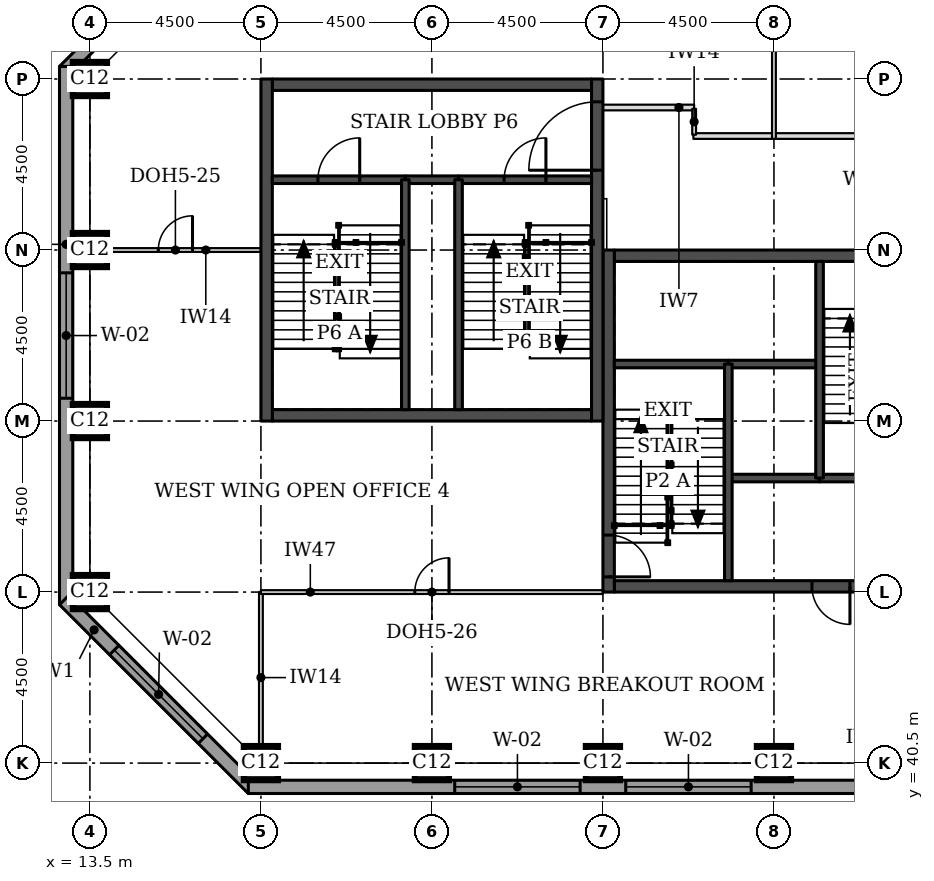
"""IFC4 building model, lengths in metres.
Left out: names, types, materials, properties, quantities, classifications, styles, units other than length and angle.
Written with IfcOpenShell. Run it as: python <this file> out.ifc"""

import sys

from ifc_helpers import new_model, si_unit, direction, frame, frame_2d, origin, origin_2d, place, context, subcontext, project, spatial, rectangle, extrude, element, fill, save


model = new_model("IFC4")
c1 = context("Model", 3, precision=1e-05, world=origin(), true_north=direction((0.0, 1.0)))
c2 = subcontext(c1, "Body", "Model", "MODEL_VIEW")
j1 = project(units=[si_unit("LENGTHUNIT", "METRE"), si_unit("PLANEANGLEUNIT", "RADIAN")], contexts=[c1])
p1 = place(None, origin())
s1 = spatial("IfcSite", under=j1, at=p1, CompositionType="ELEMENT")
p2 = place(p1, origin())
s2 = spatial("IfcBuilding", under=s1, at=p2, CompositionType="ELEMENT")
p3 = place(p2, frame((0.0, 0.0, 177.3)))
s3 = spatial("IfcBuildingStorey", under=s2, at=p3, CompositionType="ELEMENT", Elevation=177.3)
for number, where, z_axis, x_axis in (
    (1, (18.0, 40.5, 0.0), (0.0, 0.0, 1.0), (1.0, 0.0, 0.0)),
    (2, (22.5, 40.5, 0.0), (0.0, 0.0, 1.0), (1.0, 0.0, 0.0)),
    (3, (27.0, 40.5, 0.0), (0.0, 0.0, 1.0), (1.0, 0.0, 0.0)),
    (4, (31.5, 40.5, 0.0), (0.0, 0.0, 1.0), (1.0, 0.0, 0.0)),
    (5, (13.5, 45.0, 0.0), (0.0, 0.0, 1.0), (1.0, 0.0, 0.0)),
    (6, (13.5, 49.5, 0.0), (0.0, 0.0, 1.0), (1.0, 0.0, 0.0)),
    (7, (13.5, 54.0, 0.0), (0.0, 0.0, 1.0), (1.0, 0.0, 0.0)),
    (8, (13.5, 58.5, 0.0), (0.0, 0.0, 1.0), (1.0, 0.0, 0.0)),
):
    element("IfcColumn", number, at=place(p3, frame(where, z_axis=z_axis, x_axis=x_axis)), inside=s3, PredefinedType="COLUMN", context=c2, shape_type="SweptSolid", body=[
        extrude(rectangle(XDim=0.9, YDim=0.9, at=origin_2d()), origin(), (0.0, 0.0, 1.0), 3.7),
    ])
p4 = place(p3, frame((27.3, 45.15, 0.0), z_axis=(0.0, 0.0, 1.0), x_axis=(1.0, 0.0, 0.0)))
e9 = element("IfcWall", 9, at=p4, inside=s3, PredefinedType="SHEAR", context=c2, shape_type="SweptSolid", body=[
    extrude(rectangle(XDim=8.4, YDim=0.3, at=frame_2d((4.2, 0.0))), origin(), (0.0, 0.0, 1.0), 3.7),
])
p5 = place(p4, frame((5.2, 0.0, 0.0)))
e10 = element("IfcOpeningElement", 10, at=p5, cuts=e9, PredefinedType="OPENING", context=c2, shape_type="SweptSolid", body=[
    extrude(rectangle(XDim=1.0, YDim=2.1, at=frame_2d((0.5, 1.05))), frame((0.0, 0.16, 0.0), z_axis=(0.0, -1.0, 0.0), x_axis=(1.0, 0.0, 0.0)), (0.0, 0.0, 1.0), 0.32),
])
p6 = place(p3, frame((27.3, 53.85, 0.0), z_axis=(0.0, 0.0, 1.0), x_axis=(1.0, 0.0, 0.0)))
e11 = element("IfcWall", 11, at=p6, inside=s3, PredefinedType="SHEAR", context=c2, shape_type="SweptSolid", body=[
    extrude(rectangle(XDim=8.4, YDim=0.3, at=frame_2d((4.2, 0.0))), origin(), (0.0, 0.0, 1.0), 3.7),
])
p7 = place(p6, frame((6.4, 0.0, 0.0)))
e12 = element("IfcOpeningElement", 12, at=p7, cuts=e11, PredefinedType="OPENING", context=c2, shape_type="SweptSolid", body=[
    extrude(rectangle(XDim=1.1, YDim=2.1, at=frame_2d((0.55, 1.05))), frame((0.0, 0.16, 0.0), z_axis=(0.0, -1.0, 0.0), x_axis=(1.0, 0.0, 0.0)), (0.0, 0.0, 1.0), 0.32),
])
p8 = place(p3, frame((27.15, 45.0, 0.0), z_axis=(0.0, 0.0, 1.0), x_axis=(0.0, 1.0, 0.0)))
e13 = element("IfcWall", 13, at=p8, inside=s3, PredefinedType="SHEAR", context=c2, shape_type="SweptSolid", body=[
    extrude(rectangle(XDim=9.0, YDim=0.3, at=frame_2d((4.5, 0.0))), origin(), (0.0, 0.0, 1.0), 3.7),
])
p9 = place(p8, frame((0.4, 0.0, 0.0)))
e14 = element("IfcOpeningElement", 14, at=p9, cuts=e13, PredefinedType="OPENING", context=c2, shape_type="SweptSolid", body=[
    extrude(rectangle(XDim=1.1, YDim=2.1, at=frame_2d((0.55, 1.05))), frame((0.0, 0.16, 0.0), z_axis=(0.0, -1.0, 0.0), x_axis=(1.0, 0.0, 0.0)), (0.0, 0.0, 1.0), 0.32),
])
for number, where, z_axis, x_axis in (
    (15, (18.3, 49.65, 0.0), (0.0, 0.0, 1.0), (1.0, 0.0, 0.0)),
    (16, (18.3, 58.35, 0.0), (0.0, 0.0, 1.0), (1.0, 0.0, 0.0)),
):
    element("IfcWall", number, at=place(p3, frame(where, z_axis=z_axis, x_axis=x_axis)), inside=s3, PredefinedType="SHEAR", context=c2, shape_type="SweptSolid", body=[
        extrude(rectangle(XDim=8.4, YDim=0.3, at=frame_2d((4.2, 0.0))), origin(), (0.0, 0.0, 1.0), 3.7),
    ])
p10 = place(p3, frame((18.15, 49.5, 0.0), z_axis=(0.0, 0.0, 1.0), x_axis=(0.0, 1.0, 0.0)))
e17 = element("IfcWall", 17, at=p10, inside=s3, PredefinedType="SHEAR", context=c2, shape_type="SweptSolid", body=[
    extrude(rectangle(XDim=9.0, YDim=0.3, at=frame_2d((4.5, 0.0))), origin(), (0.0, 0.0, 1.0), 3.7),
])
p11 = place(p3, frame((26.85, 49.5, 0.0), z_axis=(0.0, 0.0, 1.0), x_axis=(0.0, 1.0, 0.0)))
e18 = element("IfcWall", 18, at=p11, inside=s3, PredefinedType="SHEAR", context=c2, shape_type="SweptSolid", body=[
    extrude(rectangle(XDim=9.0, YDim=0.3, at=frame_2d((4.5, 0.0))), origin(), (0.0, 0.0, 1.0), 3.7),
])
p12 = place(p11, frame((6.6, 0.0, 0.0)))
e19 = element("IfcOpeningElement", 19, at=p12, cuts=e18, PredefinedType="OPENING", context=c2, shape_type="SweptSolid", body=[
    extrude(rectangle(XDim=1.8, YDim=2.1, at=frame_2d((0.9, 1.05))), frame((0.0, 0.16, 0.0), z_axis=(0.0, -1.0, 0.0), x_axis=(1.0, 0.0, 0.0)), (0.0, 0.0, 1.0), 0.32),
])
p13 = place(p3, frame((17.792, 63.676, 0.0), z_axis=(0.0, 0.0, 1.0), x_axis=(-0.707106781187, -0.707106781187, 0.0)))
e20 = element("IfcWall", 20, at=p13, inside=s3, PredefinedType="STANDARD", context=c2, shape_type="SweptSolid", body=[
    extrude(rectangle(XDim=7.027, YDim=0.35, at=frame_2d((3.513, 0.0))), origin(), (0.0, 0.0, 1.0), 3.525),
])
p14 = place(p13, frame((1.863, 0.0, 0.9)))
e21 = element("IfcOpeningElement", 21, at=p14, cuts=e20, PredefinedType="OPENING", context=c2, shape_type="SweptSolid", body=[
    extrude(rectangle(XDim=3.3, YDim=1.9, at=frame_2d((1.65, 0.95))), frame((0.0, 0.185, 0.0), z_axis=(0.0, -1.0, 0.0), x_axis=(1.0, 0.0, 0.0)), (0.0, 0.0, 1.0), 0.37),
])
p15 = place(p3, frame((12.875, 58.831, 0.0), z_axis=(0.0, 0.0, 1.0), x_axis=(0.0, -1.0, 0.0)))
e22 = element("IfcWall", 22, at=p15, inside=s3, PredefinedType="STANDARD", context=c2, shape_type="SweptSolid", body=[
    extrude(rectangle(XDim=14.163, YDim=0.35, at=frame_2d((7.081, 0.0))), origin(), (0.0, 0.0, 1.0), 3.525),
])
p16 = place(p15, frame((5.431, 0.0, 0.9)))
e23 = element("IfcOpeningElement", 23, at=p16, cuts=e22, PredefinedType="OPENING", context=c2, shape_type="SweptSolid", body=[
    extrude(rectangle(XDim=3.3, YDim=1.9, at=frame_2d((1.65, 0.95))), frame((0.0, 0.185, 0.0), z_axis=(0.0, -1.0, 0.0), x_axis=(1.0, 0.0, 0.0)), (0.0, 0.0, 1.0), 0.37),
])
p17 = place(p3, frame((12.824, 44.792, 0.0), z_axis=(0.0, 0.0, 1.0), x_axis=(0.707106781187, -0.707106781187, 0.0)))
e24 = element("IfcWall", 24, at=p17, inside=s3, PredefinedType="STANDARD", context=c2, shape_type="SweptSolid", body=[
    extrude(rectangle(XDim=7.027, YDim=0.35, at=frame_2d((3.513, 0.0))), origin(), (0.0, 0.0, 1.0), 3.525),
])
p18 = place(p17, frame((1.863, 0.0, 0.9)))
e25 = element("IfcOpeningElement", 25, at=p18, cuts=e24, PredefinedType="OPENING", context=c2, shape_type="SweptSolid", body=[
    extrude(rectangle(XDim=3.3, YDim=1.9, at=frame_2d((1.65, 0.95))), frame((0.0, 0.185, 0.0), z_axis=(0.0, -1.0, 0.0), x_axis=(1.0, 0.0, 0.0)), (0.0, 0.0, 1.0), 0.37),
])
p19 = place(p3, frame((17.669, 39.875, 0.0), z_axis=(0.0, 0.0, 1.0), x_axis=(1.0, 0.0, 0.0)))
e26 = element("IfcWall", 26, at=p19, inside=s3, PredefinedType="STANDARD", context=c2, shape_type="SweptSolid", body=[
    extrude(rectangle(XDim=18.331, YDim=0.35, at=frame_2d((9.166, 0.0))), origin(), (0.0, 0.0, 1.0), 3.525),
])
p20 = place(p19, frame((5.431, 0.0, 0.9)))
e27 = element("IfcOpeningElement", 27, at=p20, cuts=e26, PredefinedType="OPENING", context=c2, shape_type="SweptSolid", body=[
    extrude(rectangle(XDim=3.3, YDim=1.9, at=frame_2d((1.65, 0.95))), frame((0.0, 0.185, 0.0), z_axis=(0.0, -1.0, 0.0), x_axis=(1.0, 0.0, 0.0)), (0.0, 0.0, 1.0), 0.37),
])
p21 = place(p19, frame((9.931, 0.0, 0.9)))
e28 = element("IfcOpeningElement", 28, at=p21, cuts=e26, PredefinedType="OPENING", context=c2, shape_type="SweptSolid", body=[
    extrude(rectangle(XDim=3.3, YDim=1.9, at=frame_2d((1.65, 0.95))), frame((0.0, 0.185, 0.0), z_axis=(0.0, -1.0, 0.0), x_axis=(1.0, 0.0, 0.0)), (0.0, 0.0, 1.0), 0.37),
])
p22 = place(p3, frame((29.38, 57.0, 0.0), z_axis=(0.0, 0.0, 1.0), x_axis=(1.0, 0.0, 0.0)))
e29 = element("IfcWall", 29, at=p22, inside=s3, PredefinedType="PARTITIONING", context=c2, shape_type="SweptSolid", body=[
    extrude(rectangle(XDim=12.695, YDim=0.15, at=frame_2d((6.348, 0.0))), origin(), (0.0, 0.0, 1.0), 3.55),
])
p23 = place(p3, frame((31.5, 63.0, 0.0), z_axis=(0.0, 0.0, 1.0), x_axis=(0.0, -1.0, 0.0)))
e30 = element("IfcWall", 30, at=p23, inside=s3, PredefinedType="PARTITIONING", context=c2, shape_type="SweptSolid", body=[
    extrude(rectangle(XDim=6.075, YDim=0.1, at=frame_2d((3.038, 0.0))), origin(), (0.0, 0.0, 1.0), 3.55),
])
p24 = place(p23, frame((2.588, 0.0, 0.0)))
e31 = element("IfcOpeningElement", 31, at=p24, cuts=e30, PredefinedType="OPENING", context=c2, shape_type="SweptSolid", body=[
    extrude(rectangle(XDim=0.9, YDim=2.1, at=frame_2d((0.45, 1.05))), frame((0.0, 0.06, 0.0), z_axis=(0.0, -1.0, 0.0), x_axis=(1.0, 0.0, 0.0)), (0.0, 0.0, 1.0), 0.12),
])
p25 = place(p3, frame((13.5, 54.0, 0.0), z_axis=(0.0, 0.0, 1.0), x_axis=(1.0, 0.0, 0.0)))
e32 = element("IfcWall", 32, at=p25, inside=s3, PredefinedType="PARTITIONING", context=c2, shape_type="SweptSolid", body=[
    extrude(rectangle(XDim=4.5, YDim=0.1, at=frame_2d((2.25, 0.0))), origin(), (0.0, 0.0, 1.0), 3.55),
])
p26 = place(p25, frame((1.8, 0.0, 0.0)))
e33 = element("IfcOpeningElement", 33, at=p26, cuts=e32, PredefinedType="OPENING", context=c2, shape_type="SweptSolid", body=[
    extrude(rectangle(XDim=0.9, YDim=2.1, at=frame_2d((0.45, 1.05))), frame((0.0, 0.06, 0.0), z_axis=(0.0, -1.0, 0.0), x_axis=(1.0, 0.0, 0.0)), (0.0, 0.0, 1.0), 0.12),
])
p27 = place(p3, frame((18.0, 40.5, 0.0), z_axis=(0.0, 0.0, 1.0), x_axis=(0.0, 1.0, 0.0)))
e34 = element("IfcWall", 34, at=p27, inside=s3, PredefinedType="PARTITIONING", context=c2, shape_type="SweptSolid", body=[
    extrude(rectangle(XDim=4.5, YDim=0.1, at=frame_2d((2.25, 0.0))), origin(), (0.0, 0.0, 1.0), 3.55),
])
p28 = place(p3, frame((18.0, 45.0, 0.0), z_axis=(0.0, 0.0, 1.0), x_axis=(1.0, 0.0, 0.0)))
e35 = element("IfcWall", 35, at=p28, inside=s3, PredefinedType="PARTITIONING", context=c2, shape_type="SweptSolid", body=[
    extrude(rectangle(XDim=9.0, YDim=0.1, at=frame_2d((4.5, 0.0))), origin(), (0.0, 0.0, 1.0), 2.55),
])
p29 = place(p28, frame((4.05, 0.0, 0.0)))
e36 = element("IfcOpeningElement", 36, at=p29, cuts=e35, PredefinedType="OPENING", context=c2, shape_type="SweptSolid", body=[
    extrude(rectangle(XDim=0.9, YDim=2.1, at=frame_2d((0.45, 1.05))), frame((0.0, 0.06, 0.0), z_axis=(0.0, -1.0, 0.0), x_axis=(1.0, 0.0, 0.0)), (0.0, 0.0, 1.0), 0.12),
])
p30 = place(p3, frame((27.0, 57.75, 0.0), z_axis=(0.0, 0.0, 1.0), x_axis=(1.0, 0.0, 0.0)))
e37 = element("IfcWall", 37, at=p30, inside=s3, PredefinedType="PARTITIONING", context=c2, shape_type="SweptSolid", body=[
    extrude(rectangle(XDim=2.4, YDim=0.15, at=frame_2d((1.2, 0.0))), origin(), (0.0, 0.0, 1.0), 3.55),
])
p31 = place(p3, frame((29.4, 57.715, 0.0), z_axis=(0.0, 0.0, 1.0), x_axis=(0.0, -1.0, 0.0)))
e38 = element("IfcWall", 38, at=p31, inside=s3, PredefinedType="PARTITIONING", context=c2, shape_type="SweptSolid", body=[
    extrude(rectangle(XDim=0.68, YDim=0.1, at=frame_2d((0.34, 0.0))), origin(), (0.0, 0.0, 1.0), 3.55),
])
p32 = place(p3, frame((30.3, 48.0, 0.0), z_axis=(0.0, 0.0, 1.0), x_axis=(1.0, 0.0, 0.0)))
e39 = element("IfcWall", 39, at=p32, inside=s3, PredefinedType="SOLIDWALL", context=c2, shape_type="SweptSolid", body=[
    extrude(rectangle(XDim=2.4, YDim=0.2, at=frame_2d((1.2, 0.0))), origin(), (0.0, 0.0, 1.0), 3.55),
])
p33 = place(p3, frame((32.7, 48.0, 0.0), z_axis=(0.0, 0.0, 1.0), x_axis=(1.0, 0.0, 0.0)))
e40 = element("IfcWall", 40, at=p33, inside=s3, PredefinedType="SOLIDWALL", context=c2, shape_type="SweptSolid", body=[
    extrude(rectangle(XDim=3.0, YDim=0.2, at=frame_2d((1.5, 0.0))), origin(), (0.0, 0.0, 1.0), 3.55),
])
p34 = place(p3, frame((30.3, 51.0, 0.0), z_axis=(0.0, 0.0, 1.0), x_axis=(1.0, 0.0, 0.0)))
e41 = element("IfcWall", 41, at=p34, inside=s3, PredefinedType="SOLIDWALL", context=c2, shape_type="SweptSolid", body=[
    extrude(rectangle(XDim=2.4, YDim=0.2, at=frame_2d((1.2, 0.0))), origin(), (0.0, 0.0, 1.0), 3.7),
])
p35 = place(p3, frame((27.3, 51.0, 0.0), z_axis=(0.0, 0.0, 1.0), x_axis=(1.0, 0.0, 0.0)))
e42 = element("IfcWall", 42, at=p35, inside=s3, PredefinedType="SOLIDWALL", context=c2, shape_type="SweptSolid", body=[
    extrude(rectangle(XDim=3.0, YDim=0.2, at=frame_2d((1.5, 0.0))), origin(), (0.0, 0.0, 1.0), 3.55),
])
for number, where, z_axis, x_axis in (
    (43, (30.3, 45.3, 0.0), (0.0, 0.0, 1.0), (0.0, 1.0, 0.0)),
    (44, (32.7, 48.0, 0.0), (0.0, 0.0, 1.0), (0.0, 1.0, 0.0)),
):
    element("IfcWall", number, at=place(p3, frame(where, z_axis=z_axis, x_axis=x_axis)), inside=s3, PredefinedType="SOLIDWALL", context=c2, shape_type="SweptSolid", body=[
        extrude(rectangle(XDim=5.7, YDim=0.2, at=frame_2d((2.85, 0.0))), origin(), (0.0, 0.0, 1.0), 3.55),
    ])
p36 = place(p3, frame((21.8, 55.85, 0.0), z_axis=(0.0, 0.0, 1.0), x_axis=(1.0, 0.0, 0.0)))
e45 = element("IfcWall", 45, at=p36, inside=s3, PredefinedType="SOLIDWALL", context=c2, shape_type="SweptSolid", body=[
    extrude(rectangle(XDim=1.4, YDim=0.2, at=frame_2d((0.7, 0.0))), origin(), (0.0, 0.0, 1.0), 3.55),
])
p37 = place(p3, frame((18.3, 55.85, 0.0), z_axis=(0.0, 0.0, 1.0), x_axis=(1.0, 0.0, 0.0)))
e46 = element("IfcWall", 46, at=p37, inside=s3, PredefinedType="SOLIDWALL", context=c2, shape_type="SweptSolid", body=[
    extrude(rectangle(XDim=3.5, YDim=0.2, at=frame_2d((1.75, 0.0))), origin(), (0.0, 0.0, 1.0), 3.55),
])
p38 = place(p37, frame((1.2, 0.0, 0.0)))
e47 = element("IfcOpeningElement", 47, at=p38, cuts=e46, PredefinedType="OPENING", context=c2, shape_type="SweptSolid", body=[
    extrude(rectangle(XDim=1.1, YDim=2.1, at=frame_2d((0.55, 1.05))), frame((0.0, 0.11, 0.0), z_axis=(0.0, -1.0, 0.0), x_axis=(1.0, 0.0, 0.0)), (0.0, 0.0, 1.0), 0.22),
])
p39 = place(p3, frame((23.2, 55.85, 0.0), z_axis=(0.0, 0.0, 1.0), x_axis=(1.0, 0.0, 0.0)))
e48 = element("IfcWall", 48, at=p39, inside=s3, PredefinedType="SOLIDWALL", context=c2, shape_type="SweptSolid", body=[
    extrude(rectangle(XDim=3.5, YDim=0.2, at=frame_2d((1.75, 0.0))), origin(), (0.0, 0.0, 1.0), 3.55),
])
p40 = place(p39, frame((1.2, 0.0, 0.0)))
e49 = element("IfcOpeningElement", 49, at=p40, cuts=e48, PredefinedType="OPENING", context=c2, shape_type="SweptSolid", body=[
    extrude(rectangle(XDim=1.1, YDim=2.1, at=frame_2d((0.55, 1.05))), frame((0.0, 0.11, 0.0), z_axis=(0.0, -1.0, 0.0), x_axis=(1.0, 0.0, 0.0)), (0.0, 0.0, 1.0), 0.22),
])
for number, where, z_axis, x_axis in (
    (50, (21.8, 49.8, 0.0), (0.0, 0.0, 1.0), (0.0, 1.0, 0.0)),
    (51, (23.2, 49.8, 0.0), (0.0, 0.0, 1.0), (0.0, 1.0, 0.0)),
):
    element("IfcWall", number, at=place(p3, frame(where, z_axis=z_axis, x_axis=x_axis)), inside=s3, PredefinedType="SOLIDWALL", context=c2, shape_type="SweptSolid", body=[
        extrude(rectangle(XDim=6.05, YDim=0.2, at=frame_2d((3.025, 0.0))), origin(), (0.0, 0.0, 1.0), 3.55),
    ])
p41 = place(p16, origin())
e52 = element("IfcWindow", 52, at=p41, inside=s3, PartitioningType="SINGLE_PANEL", PredefinedType="WINDOW", context=c2, shape_type="SweptSolid", body=[
    extrude(rectangle(XDim=3.3, YDim=1.9, at=frame_2d((1.65, 0.95))), frame((0.0, 0.085, 0.0), z_axis=(0.0, -1.0, 0.0), x_axis=(1.0, 0.0, 0.0)), (0.0, 0.0, 1.0), 0.06),
])
fill(e23, e52)
p42 = place(p18, origin())
e53 = element("IfcWindow", 53, at=p42, inside=s3, PartitioningType="SINGLE_PANEL", PredefinedType="WINDOW", context=c2, shape_type="SweptSolid", body=[
    extrude(rectangle(XDim=3.3, YDim=1.9, at=frame_2d((1.65, 0.95))), frame((0.0, 0.085, 0.0), z_axis=(0.0, -1.0, 0.0), x_axis=(1.0, 0.0, 0.0)), (0.0, 0.0, 1.0), 0.06),
])
fill(e25, e53)
p43 = place(p20, origin())
e54 = element("IfcWindow", 54, at=p43, inside=s3, PartitioningType="SINGLE_PANEL", PredefinedType="WINDOW", context=c2, shape_type="SweptSolid", body=[
    extrude(rectangle(XDim=3.3, YDim=1.9, at=frame_2d((1.65, 0.95))), frame((0.0, 0.085, 0.0), z_axis=(0.0, -1.0, 0.0), x_axis=(1.0, 0.0, 0.0)), (0.0, 0.0, 1.0), 0.06),
])
fill(e27, e54)
p44 = place(p21, origin())
e55 = element("IfcWindow", 55, at=p44, inside=s3, PartitioningType="SINGLE_PANEL", PredefinedType="WINDOW", context=c2, shape_type="SweptSolid", body=[
    extrude(rectangle(XDim=3.3, YDim=1.9, at=frame_2d((1.65, 0.95))), frame((0.0, 0.085, 0.0), z_axis=(0.0, -1.0, 0.0), x_axis=(1.0, 0.0, 0.0)), (0.0, 0.0, 1.0), 0.06),
])
fill(e28, e55)
p45 = place(p26, origin())
e56 = element("IfcDoor", 56, at=p45, inside=s3, OperationType="SINGLE_SWING_RIGHT", PredefinedType="DOOR", context=c2, shape_type="SweptSolid", body=[
    extrude(rectangle(XDim=0.9, YDim=2.1, at=frame_2d((0.45, 1.05))), frame((0.0, 0.025, 0.0), z_axis=(0.0, -1.0, 0.0), x_axis=(1.0, 0.0, 0.0)), (0.0, 0.0, 1.0), 0.05),
])
fill(e33, e56)
p46 = place(p29, origin())
e57 = element("IfcDoor", 57, at=p46, inside=s3, OperationType="SINGLE_SWING_RIGHT", PredefinedType="DOOR", context=c2, shape_type="SweptSolid", body=[
    extrude(rectangle(XDim=0.9, YDim=2.1, at=frame_2d((0.45, 1.05))), frame((0.0, 0.025, 0.0), z_axis=(0.0, -1.0, 0.0), x_axis=(1.0, 0.0, 0.0)), (0.0, 0.0, 1.0), 0.05),
])
fill(e36, e57)
p47 = place(p9, frame((1.1, 0.0, 0.0), z_axis=(0.0, 0.0, 1.0), x_axis=(-1.0, 0.0, 0.0)))
e58 = element("IfcDoor", 58, at=p47, inside=s3, OperationType="SINGLE_SWING_RIGHT", PredefinedType="DOOR", context=c2, shape_type="SweptSolid", body=[
    extrude(rectangle(XDim=1.1, YDim=2.1, at=frame_2d((0.55, 1.05))), frame((0.0, 0.025, 0.0), z_axis=(0.0, -1.0, 0.0), x_axis=(1.0, 0.0, 0.0)), (0.0, 0.0, 1.0), 0.05),
])
fill(e14, e58)
p48 = place(p5, frame((1.0, 0.0, 0.0), z_axis=(0.0, 0.0, 1.0), x_axis=(-1.0, 0.0, 0.0)))
e59 = element("IfcDoor", 59, at=p48, inside=s3, OperationType="SINGLE_SWING_LEFT", PredefinedType="DOOR", context=c2, shape_type="SweptSolid", body=[
    extrude(rectangle(XDim=1.0, YDim=2.1, at=frame_2d((0.5, 1.05))), frame((0.0, 0.025, 0.0), z_axis=(0.0, -1.0, 0.0), x_axis=(1.0, 0.0, 0.0)), (0.0, 0.0, 1.0), 0.05),
])
fill(e10, e59)
p49 = place(p38, origin())
e60 = element("IfcDoor", 60, at=p49, inside=s3, OperationType="SINGLE_SWING_RIGHT", PredefinedType="DOOR", context=c2, shape_type="SweptSolid", body=[
    extrude(rectangle(XDim=1.1, YDim=2.1, at=frame_2d((0.55, 1.05))), frame((0.0, 0.025, 0.0), z_axis=(0.0, -1.0, 0.0), x_axis=(1.0, 0.0, 0.0)), (0.0, 0.0, 1.0), 0.05),
])
fill(e47, e60)
p50 = place(p40, origin())
e61 = element("IfcDoor", 61, at=p50, inside=s3, OperationType="SINGLE_SWING_RIGHT", PredefinedType="DOOR", context=c2, shape_type="SweptSolid", body=[
    extrude(rectangle(XDim=1.1, YDim=2.1, at=frame_2d((0.55, 1.05))), frame((0.0, 0.025, 0.0), z_axis=(0.0, -1.0, 0.0), x_axis=(1.0, 0.0, 0.0)), (0.0, 0.0, 1.0), 0.05),
])
fill(e49, e61)
p51 = place(p12, origin())
e62 = element("IfcDoor", 62, at=p51, inside=s3, OperationType="SINGLE_SWING_LEFT", PredefinedType="DOOR", context=c2, shape_type="SweptSolid", body=[
    extrude(rectangle(XDim=1.8, YDim=2.1, at=frame_2d((0.9, 1.05))), frame((0.0, 0.025, 0.0), z_axis=(0.0, -1.0, 0.0), x_axis=(1.0, 0.0, 0.0)), (0.0, 0.0, 1.0), 0.05),
])
fill(e19, e62)
save(model, sys.argv[1])
